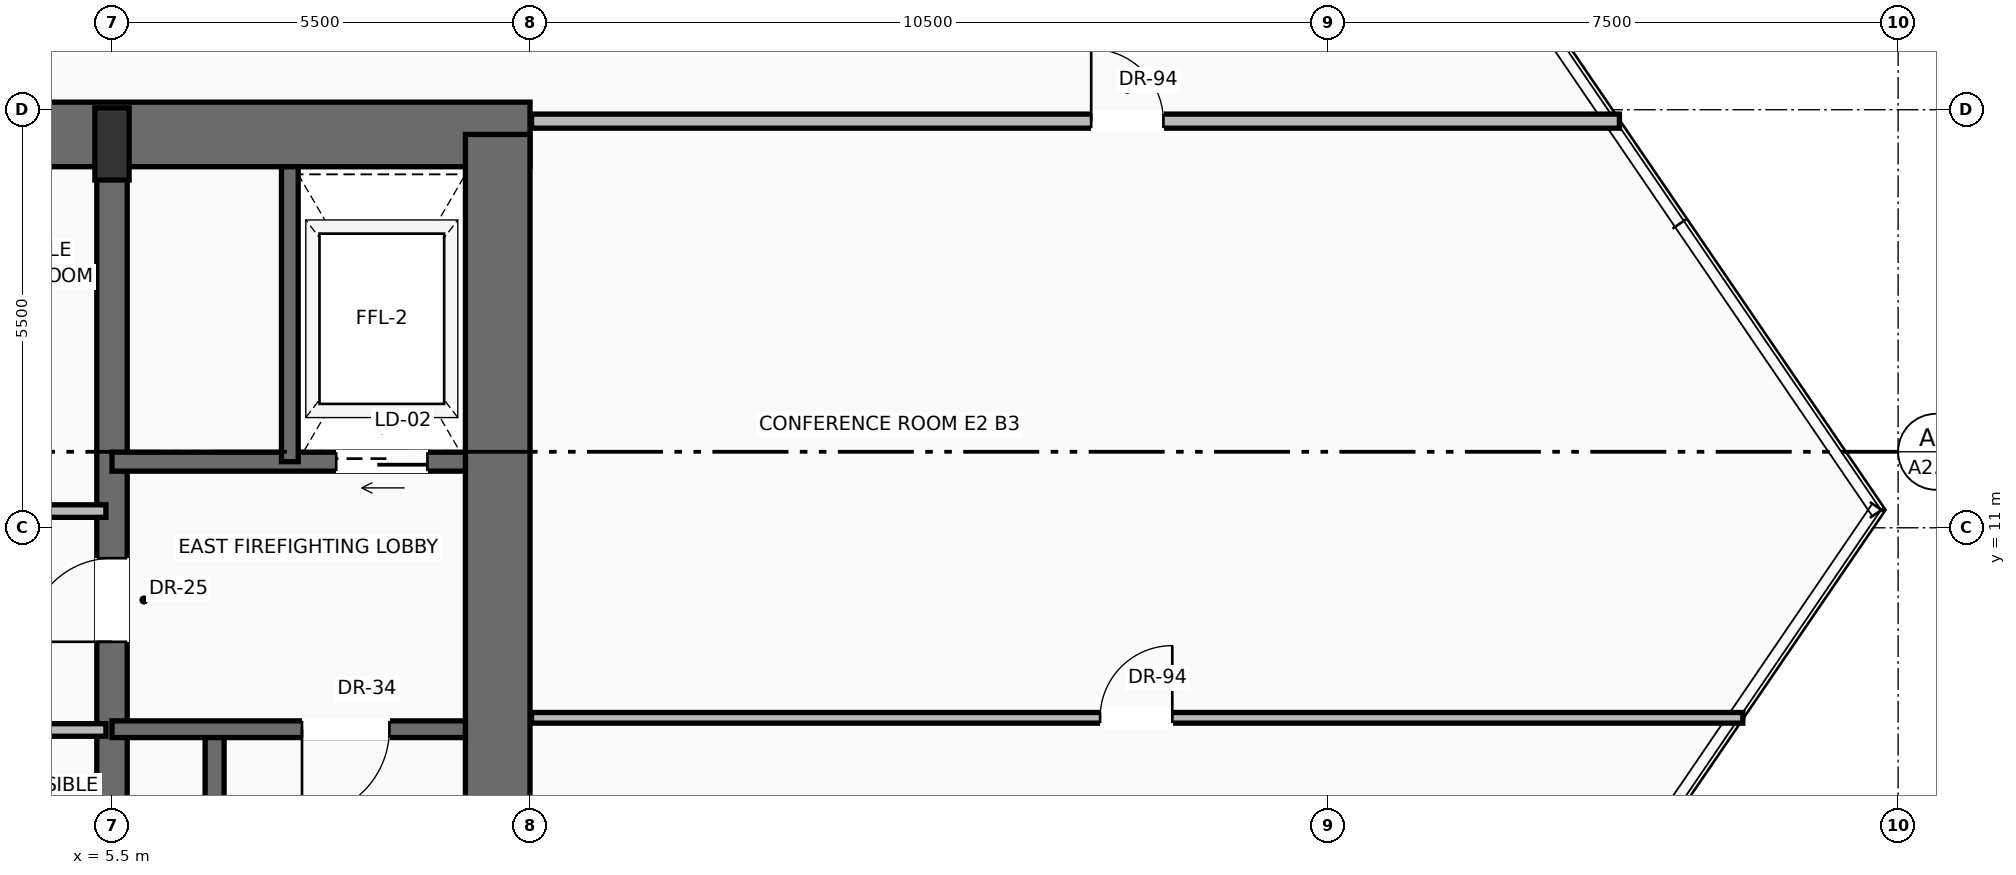
"""IFC4 building model, lengths in metres.
Left out: names, types, materials, properties, quantities, classifications, styles, units other than length and angle.
Written with IfcOpenShell. Run it as: python <this file> out.ifc"""

import sys

from ifc_helpers import new_model, si_unit, direction, frame, frame_2d, origin, origin_2d, place, context, subcontext, project, spatial, rectangle, extrude, source, transform, mapped, element, fill, save


model = new_model("IFC4")
c1 = context("Model", 3, precision=1e-05, world=origin(), true_north=direction((0.0, 1.0)))
c2 = subcontext(c1, "Body", "Model", "MODEL_VIEW")
j1 = project(units=[si_unit("LENGTHUNIT", "METRE"), si_unit("PLANEANGLEUNIT", "RADIAN")], contexts=[c1])
p1 = place(None, origin())
s1 = spatial("IfcSite", under=j1, at=p1, CompositionType="ELEMENT")
p2 = place(p1, origin())
s2 = spatial("IfcBuilding", under=s1, at=p2, CompositionType="ELEMENT")
p3 = place(p2, frame((0.0, 0.0, 27.5)))
s3 = spatial("IfcBuildingStorey", under=s2, at=p3, CompositionType="ELEMENT", Elevation=27.5)
p4 = place(p3, frame((-11.0, 16.175, 0.0), z_axis=(0.0, 0.0, 1.0), x_axis=(1.0, 0.0, 0.0)))
e1 = element("IfcWall", 1, at=p4, inside=s3, PredefinedType="SHEAR", context=c2, shape_type="SweptSolid", body=[
    extrude(rectangle(XDim=22.0, YDim=0.85, at=frame_2d((11.0, 0.0))), origin(), (0.0, 0.0, 1.0), 3.45),
])
p5 = place(p4, frame((3.57, 0.0, 0.0)))
e2 = element("IfcOpeningElement", 2, at=p5, cuts=e1, PredefinedType="OPENING", context=c2, shape_type="SweptSolid", body=[
    extrude(rectangle(XDim=1.3, YDim=2.3, at=frame_2d((0.65, 1.15))), frame((0.0, 0.435, 0.0), z_axis=(0.0, -1.0, 0.0), x_axis=(1.0, 0.0, 0.0)), (0.0, 0.0, 1.0), 0.87),
])
p6 = place(p4, frame((10.0, 0.0, 0.0)))
e3 = element("IfcOpeningElement", 3, at=p6, cuts=e1, PredefinedType="OPENING", context=c2, shape_type="SweptSolid", body=[
    extrude(rectangle(XDim=2.0, YDim=2.4, at=frame_2d((1.0, 1.2))), frame((0.0, 0.435, 0.0), z_axis=(0.0, -1.0, 0.0), x_axis=(1.0, 0.0, 0.0)), (0.0, 0.0, 1.0), 0.87),
])
p7 = place(p3, frame((10.575, 0.425, 0.0), z_axis=(0.0, 0.0, 1.0), x_axis=(0.0, 1.0, 0.0)))
e4 = element("IfcWall", 4, at=p7, inside=s3, PredefinedType="SHEAR", context=c2, shape_type="SweptSolid", body=[
    extrude(rectangle(XDim=15.75, YDim=0.85, at=frame_2d((7.875, 0.0))), origin(), (0.0, 0.0, 1.0), 3.45),
])
p8 = place(p3, frame((5.5, 0.425, 0.0), z_axis=(0.0, 0.0, 1.0), x_axis=(0.0, 1.0, 0.0)))
e5 = element("IfcWall", 5, at=p8, inside=s3, PredefinedType="SHEAR", context=c2, shape_type="SweptSolid", body=[
    extrude(rectangle(XDim=15.75, YDim=0.4, at=frame_2d((7.875, 0.0))), origin(), (0.0, 0.0, 1.0), 3.45),
])
p9 = place(p8, frame((9.075, 0.0, 0.0)))
e6 = element("IfcOpeningElement", 6, at=p9, cuts=e5, PredefinedType="OPENING", context=c2, shape_type="SweptSolid", body=[
    extrude(rectangle(XDim=1.1, YDim=2.2, at=frame_2d((0.55, 1.1))), frame((0.0, 0.21, 0.0), z_axis=(0.0, -1.0, 0.0), x_axis=(1.0, 0.0, 0.0)), (0.0, 0.0, 1.0), 0.42),
])
m1 = source(origin(), c2, "Body", "SweptSolid", [
    extrude(rectangle(XDim=0.45, YDim=0.95, at=origin_2d()), origin(), (0.0, 0.0, 1.0), 3.7),
])
p10 = place(p3, frame((5.5, 16.05, 0.0), z_axis=(0.0, 0.0, 1.0), x_axis=(1.0, 0.0, 0.0)))
e7 = element("IfcColumn", 7, at=p10, inside=s3, PredefinedType="PILASTER", context=c2, shape_type="MappedRepresentation", body=[
    mapped(m1, transform((0.0, 0.0, 0.0), scale=1.0)),
])
p11 = place(p3, frame((6.85, 0.85, 0.0), z_axis=(0.0, 0.0, 1.0), x_axis=(0.0, 1.0, 0.0)))
e8 = element("IfcWall", 8, at=p11, inside=s3, PredefinedType="SOLIDWALL", context=c2, shape_type="SweptSolid", body=[
    extrude(rectangle(XDim=7.5, YDim=0.25, at=frame_2d((3.75, 0.0))), origin(), (0.0, 0.0, 1.0), 3.45),
])
p12 = place(p3, frame((10.15, 8.35, 0.0), z_axis=(0.0, 0.0, 1.0), x_axis=(-1.0, 0.0, 0.0)))
e9 = element("IfcWall", 9, at=p12, inside=s3, PredefinedType="SOLIDWALL", context=c2, shape_type="SweptSolid", body=[
    extrude(rectangle(XDim=4.65, YDim=0.22, at=frame_2d((2.325, 0.0))), origin(), (0.0, 0.0, 1.0), 3.45),
])
p13 = place(p12, frame((1.0, 0.0, 0.0)))
e10 = element("IfcOpeningElement", 10, at=p13, cuts=e9, PredefinedType="OPENING", context=c2, shape_type="SweptSolid", body=[
    extrude(rectangle(XDim=1.15, YDim=2.2, at=frame_2d((0.575, 1.1))), frame((0.0, 0.12, 0.0), z_axis=(0.0, -1.0, 0.0), x_axis=(1.0, 0.0, 0.0)), (0.0, 0.0, 1.0), 0.24),
])
p14 = place(p3, frame((10.15, 11.87, 0.0), z_axis=(0.0, 0.0, 1.0), x_axis=(-1.0, 0.0, 0.0)))
e11 = element("IfcWall", 11, at=p14, inside=s3, PredefinedType="SOLIDWALL", context=c2, shape_type="SweptSolid", body=[
    extrude(rectangle(XDim=4.65, YDim=0.25, at=frame_2d((2.325, 0.0))), origin(), (0.0, 0.0, 1.0), 3.45),
])
p15 = place(p14, frame((0.5, 0.0, 0.0)))
e12 = element("IfcOpeningElement", 12, at=p15, cuts=e11, PredefinedType="OPENING", context=c2, shape_type="SweptSolid", body=[
    extrude(rectangle(XDim=1.2, YDim=2.25, at=frame_2d((0.6, 1.125))), frame((0.0, 0.135, 0.0), z_axis=(0.0, -1.0, 0.0), x_axis=(1.0, 0.0, 0.0)), (0.0, 0.0, 1.0), 0.27),
])
p16 = place(p3, frame((7.84, 11.87, 0.0), z_axis=(0.0, 0.0, 1.0), x_axis=(0.0, 1.0, 0.0)))
e13 = element("IfcWall", 13, at=p16, inside=s3, PredefinedType="SOLIDWALL", context=c2, shape_type="SweptSolid", body=[
    extrude(rectangle(XDim=3.88, YDim=0.22, at=frame_2d((1.94, 0.0))), origin(), (0.0, 0.0, 1.0), 3.45),
])
for number, where, z_axis, x_axis in (
    (14, (3.54, 8.34, 0.0), (0.0, 0.0, 1.0), (1.0, 0.0, 0.0)),
    (15, (3.54, 11.22, 0.0), (0.0, 0.0, 1.0), (1.0, 0.0, 0.0)),
):
    element("IfcWall", number, at=place(p3, frame(where, z_axis=z_axis, x_axis=x_axis)), inside=s3, PredefinedType="PARTITIONING", context=c2, shape_type="SweptSolid", body=[
        extrude(rectangle(XDim=1.88, YDim=0.165, at=frame_2d((0.94, 0.0))), origin(), (0.0, 0.0, 1.0), 3.442),
    ])
p17 = place(p3, frame((11.02, 16.35, 0.0), z_axis=(0.0, 0.0, 1.0), x_axis=(1.0, 0.0, 0.0)))
e16 = element("IfcWall", 16, at=p17, inside=s3, PredefinedType="PARTITIONING", context=c2, shape_type="SweptSolid", body=[
    extrude(rectangle(XDim=14.313, YDim=0.185, at=frame_2d((7.157, 0.0))), origin(), (0.0, 0.0, 1.0), 2.747),
])
p18 = place(p17, frame((7.363, 0.0, 0.0)))
e17 = element("IfcOpeningElement", 17, at=p18, cuts=e16, PredefinedType="OPENING", context=c2, shape_type="SweptSolid", body=[
    extrude(rectangle(XDim=0.95, YDim=2.2, at=frame_2d((0.475, 1.1))), frame((0.0, 0.103, 0.0), z_axis=(0.0, -1.0, 0.0), x_axis=(1.0, 0.0, 0.0)), (0.0, 0.0, 1.0), 0.205),
])
p19 = place(p3, frame((11.02, 8.5, 0.0), z_axis=(0.0, 0.0, 1.0), x_axis=(1.0, 0.0, 0.0)))
e18 = element("IfcWall", 18, at=p19, inside=s3, PredefinedType="PARTITIONING", context=c2, shape_type="SweptSolid", body=[
    extrude(rectangle(XDim=15.937, YDim=0.14, at=frame_2d((7.969, 0.0))), origin(), (0.0, 0.0, 1.0), 3.442),
])
p20 = place(p19, frame((7.48, 0.0, 0.0)))
e19 = element("IfcOpeningElement", 19, at=p20, cuts=e18, PredefinedType="OPENING", context=c2, shape_type="SweptSolid", body=[
    extrude(rectangle(XDim=0.95, YDim=2.2, at=frame_2d((0.475, 1.1))), frame((0.0, 0.08, 0.0), z_axis=(0.0, -1.0, 0.0), x_axis=(1.0, 0.0, 0.0)), (0.0, 0.0, 1.0), 0.16),
])
m2 = source(origin(), c2, "Body", "SweptSolid", [
    extrude(rectangle(XDim=1.15, YDim=2.2, at=frame_2d((0.575, 1.1))), frame((0.0, 0.025, 0.0), z_axis=(0.0, -1.0, 0.0), x_axis=(1.0, 0.0, 0.0)), (0.0, 0.0, 1.0), 0.05),
])
p21 = place(p13, origin())
e20 = element("IfcDoor", 20, at=p21, inside=s3, OperationType="SINGLE_SWING_RIGHT", PredefinedType="DOOR", context=c2, shape_type="MappedRepresentation", body=[
    mapped(m2, transform((0.0, 0.0, 0.0), scale=1.0)),
])
fill(e10, e20)
m3 = source(origin(), c2, "Body", "SweptSolid", [
    extrude(rectangle(XDim=1.1, YDim=2.2, at=frame_2d((0.55, 1.1))), frame((0.0, 0.025, 0.0), z_axis=(0.0, -1.0, 0.0), x_axis=(1.0, 0.0, 0.0)), (0.0, 0.0, 1.0), 0.05),
])
p22 = place(p9, origin())
e21 = element("IfcDoor", 21, at=p22, inside=s3, OperationType="SINGLE_SWING_LEFT", PredefinedType="DOOR", context=c2, shape_type="MappedRepresentation", body=[
    mapped(m3, transform((0.0, 0.0, 0.0), scale=1.0)),
])
fill(e6, e21)
m4 = source(origin(), c2, "Body", "SweptSolid", [
    extrude(rectangle(XDim=1.2, YDim=2.25, at=frame_2d((0.6, 1.125))), frame((0.0, 0.025, 0.0), z_axis=(0.0, -1.0, 0.0), x_axis=(1.0, 0.0, 0.0)), (0.0, 0.0, 1.0), 0.05),
])
p23 = place(p15, origin())
e22 = element("IfcDoor", 22, at=p23, inside=s3, OperationType="SLIDING_TO_RIGHT", PredefinedType="DOOR", context=c2, shape_type="MappedRepresentation", body=[
    mapped(m4, transform((0.0, 0.0, 0.0), scale=1.0)),
])
fill(e12, e22)
m5 = source(origin(), c2, "Body", "SweptSolid", [
    extrude(rectangle(XDim=0.95, YDim=2.2, at=frame_2d((0.475, 1.1))), frame((0.0, 0.025, 0.0), z_axis=(0.0, -1.0, 0.0), x_axis=(1.0, 0.0, 0.0)), (0.0, 0.0, 1.0), 0.05),
])
p24 = place(p18, origin())
e23 = element("IfcDoor", 23, at=p24, inside=s3, OperationType="SINGLE_SWING_LEFT", PredefinedType="DOOR", context=c2, shape_type="MappedRepresentation", body=[
    mapped(m5, transform((0.0, 0.0, 0.0), scale=1.0)),
])
fill(e17, e23)
p25 = place(p20, origin())
e24 = element("IfcDoor", 24, at=p25, inside=s3, OperationType="SINGLE_SWING_RIGHT", PredefinedType="DOOR", context=c2, shape_type="MappedRepresentation", body=[
    mapped(m5, transform((0.0, 0.0, 0.0), scale=1.0)),
])
fill(e19, e24)
save(model, sys.argv[1])
